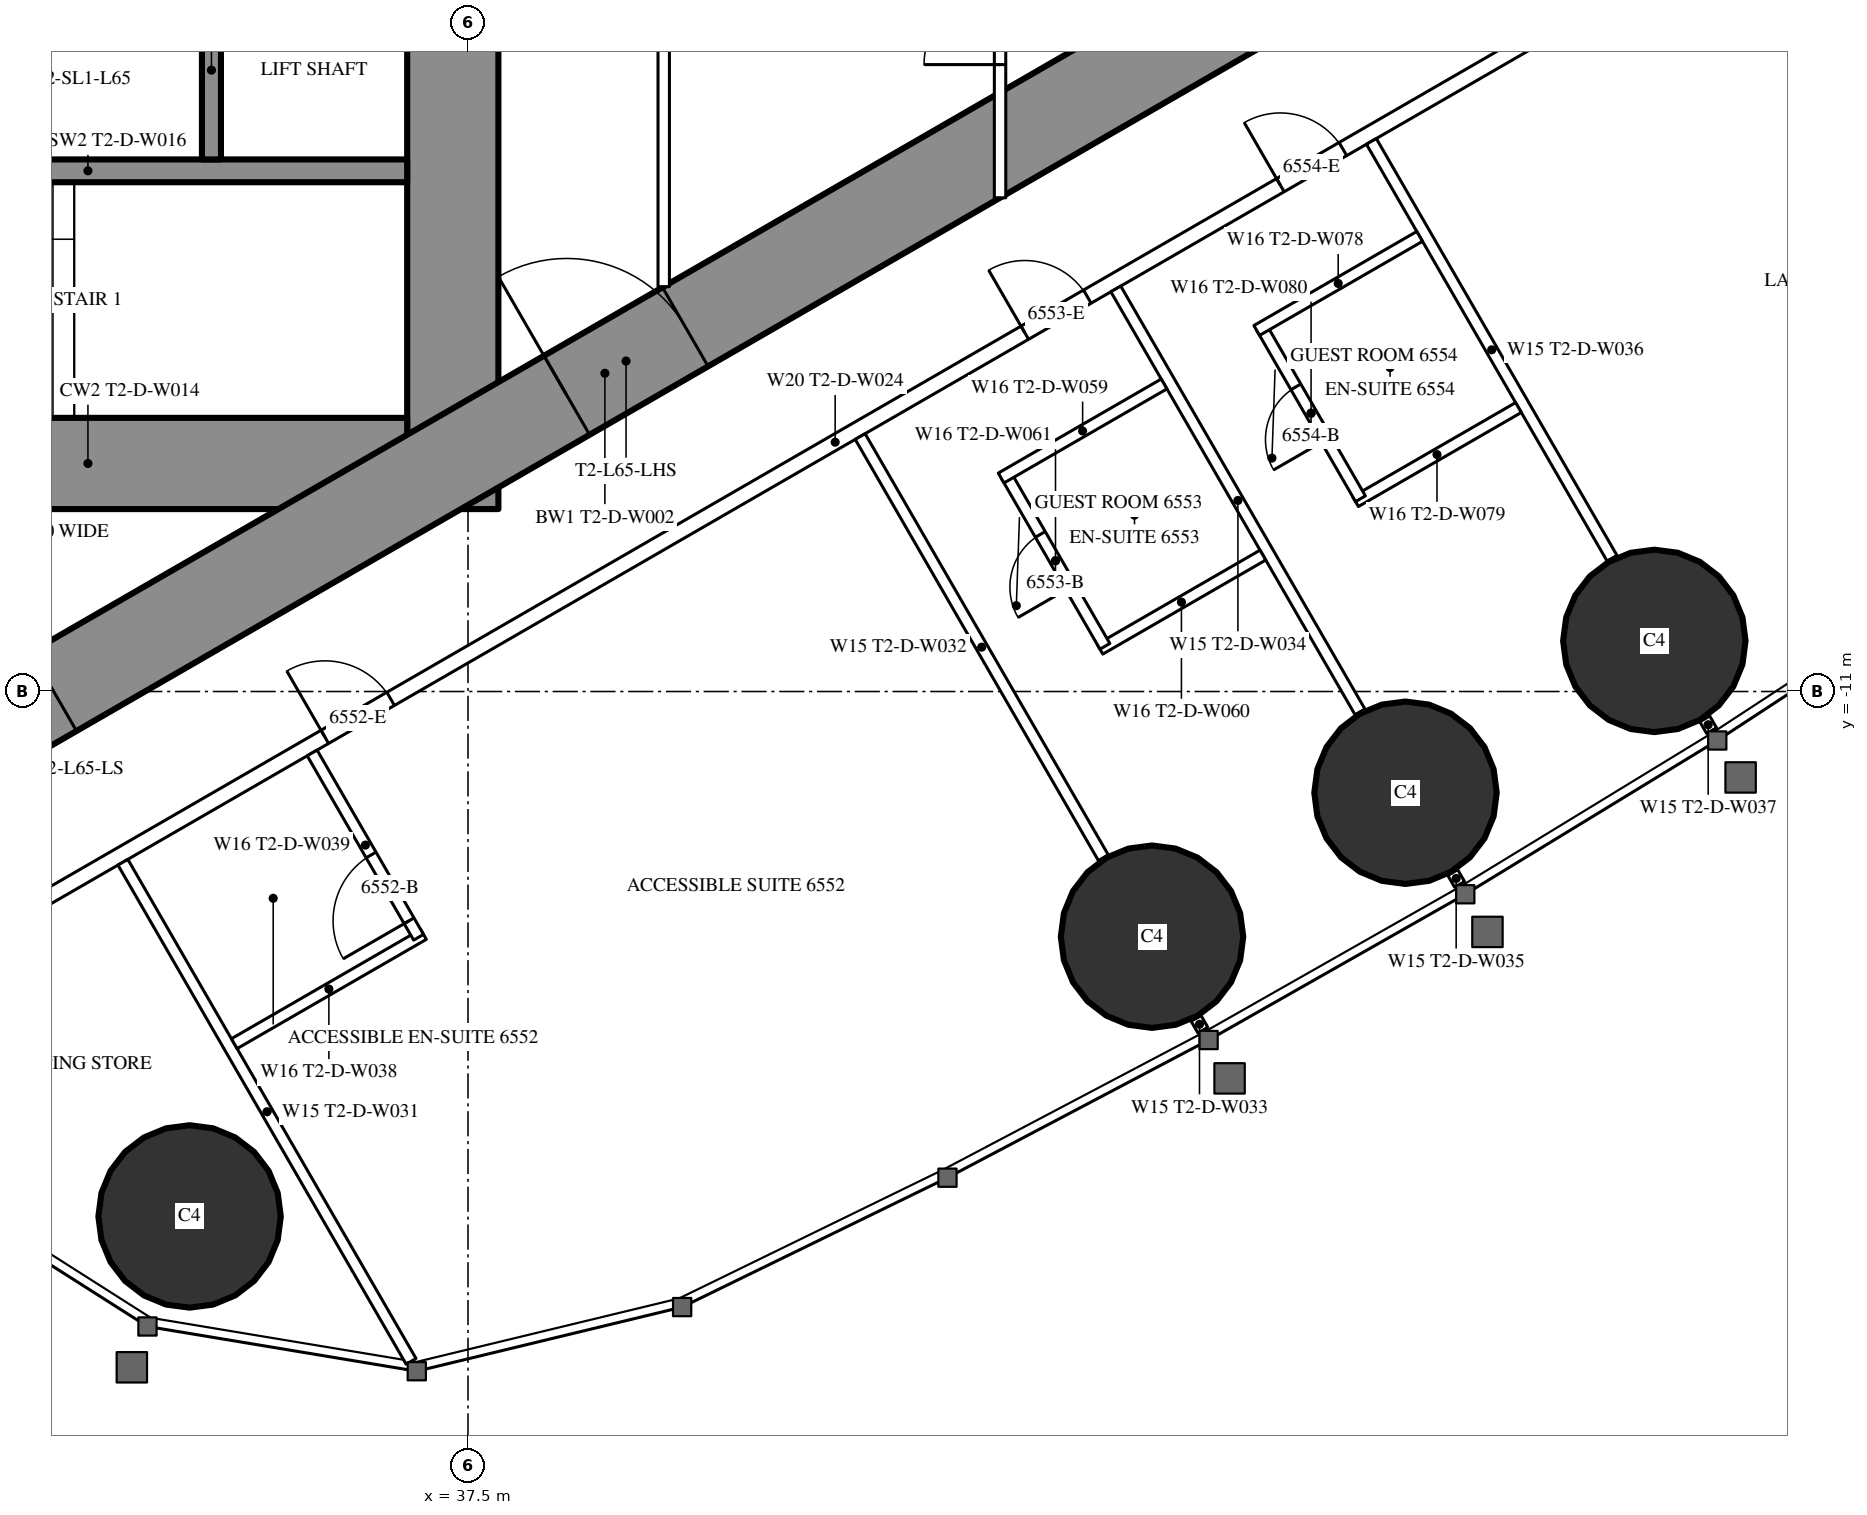
"""IFC4 building model, lengths in metres.
Left out: names, types, materials, properties, quantities, classifications, styles, units other than length and angle.
Written with IfcOpenShell. Run it as: python <this file> out.ifc"""

import sys

from ifc_helpers import new_model, si_unit, direction, frame, frame_2d, origin, origin_2d, place, context, subcontext, project, spatial, rectangle, circle, extrude, element, fill, save


model = new_model("IFC4")
c1 = context("Model", 3, precision=1e-05, world=origin(), true_north=direction((0.0, 1.0)))
c2 = subcontext(c1, "Body", "Model", "MODEL_VIEW")
j1 = project(units=[si_unit("LENGTHUNIT", "METRE"), si_unit("PLANEANGLEUNIT", "RADIAN")], contexts=[c1])
p1 = place(None, origin())
s1 = spatial("IfcSite", under=j1, at=p1, CompositionType="ELEMENT")
p2 = place(p1, origin())
s2 = spatial("IfcBuilding", under=s1, at=p2, CompositionType="ELEMENT")
p3 = place(p2, frame((0.0, 0.0, 244.1)))
s3 = spatial("IfcBuildingStorey", under=s2, at=p3, CompositionType="ELEMENT", Elevation=244.1)
for number, where, z_axis, x_axis in (
    (1, (33.837, -17.906, 0.0), (0.0, 0.0, 1.0), (1.0, 0.0, 0.0)),
    (2, (46.499, -14.226, 0.0), (0.0, 0.0, 1.0), (1.0, 0.0, 0.0)),
    (3, (49.834, -12.332, 0.0), (0.0, 0.0, 1.0), (1.0, 0.0, 0.0)),
    (4, (53.108, -10.334, 0.0), (0.0, 0.0, 1.0), (1.0, 0.0, 0.0)),
):
    element("IfcColumn", number, at=place(p3, frame(where, z_axis=z_axis, x_axis=x_axis)), inside=s3, PredefinedType="COLUMN", context=c2, shape_type="SweptSolid", body=[
        extrude(circle(Radius=1.2, at=origin_2d()), origin(), (0.0, 0.0, 1.0), 3.6),
    ])
p4 = place(p3, frame((37.3, -8.6, 0.0), z_axis=(0.0, 0.0, 1.0), x_axis=(0.0, 1.0, 0.0)))
e5 = element("IfcWall", 5, at=p4, inside=s3, PredefinedType="SHEAR", context=c2, shape_type="SweptSolid", body=[
    extrude(rectangle(XDim=17.2, YDim=1.2, at=frame_2d((8.6, 0.0))), origin(), (0.0, 0.0, 1.0), 3.6),
])
p5 = place(p4, frame((7.7, 0.0, 0.0)))
e6 = element("IfcOpeningElement", 6, at=p5, cuts=e5, PredefinedType="OPENING", context=c2, shape_type="SweptSolid", body=[
    extrude(rectangle(XDim=1.8, YDim=2.2, at=frame_2d((0.9, 1.1))), frame((0.0, 0.61, 0.0), z_axis=(0.0, -1.0, 0.0), x_axis=(1.0, 0.0, 0.0)), (0.0, 0.0, 1.0), 1.22),
])
p6 = place(p3, frame((28.3, -8.0, 0.0), z_axis=(0.0, 0.0, 1.0), x_axis=(1.0, 0.0, 0.0)))
e7 = element("IfcWall", 7, at=p6, inside=s3, PredefinedType="SHEAR", context=c2, shape_type="SweptSolid", body=[
    extrude(rectangle(XDim=8.4, YDim=1.2, at=frame_2d((4.2, 0.0))), origin(), (0.0, 0.0, 1.0), 3.6),
])
p7 = place(p6, frame((0.25, 0.0, 0.0)))
e8 = element("IfcOpeningElement", 8, at=p7, cuts=e7, PredefinedType="OPENING", context=c2, shape_type="SweptSolid", body=[
    extrude(rectangle(XDim=1.0, YDim=2.2, at=frame_2d((0.5, 1.1))), frame((0.0, 0.61, 0.0), z_axis=(0.0, -1.0, 0.0), x_axis=(1.0, 0.0, 0.0)), (0.0, 0.0, 1.0), 1.22),
])
p8 = place(p3, frame((28.3, -4.15, 0.0), z_axis=(0.0, 0.0, 1.0), x_axis=(1.0, 0.0, 0.0)))
e9 = element("IfcWall", 9, at=p8, inside=s3, PredefinedType="SHEAR", context=c2, shape_type="SweptSolid", body=[
    extrude(rectangle(XDim=8.4, YDim=0.3, at=frame_2d((4.2, 0.0))), origin(), (0.0, 0.0, 1.0), 3.6),
])
p9 = place(p3, frame((34.125, -4.0, 0.0), z_axis=(0.0, 0.0, 1.0), x_axis=(0.0, 1.0, 0.0)))
e10 = element("IfcWall", 10, at=p9, inside=s3, PredefinedType="SHEAR", context=c2, shape_type="SweptSolid", body=[
    extrude(rectangle(XDim=2.35, YDim=0.25, at=frame_2d((1.175, 0.0))), origin(), (0.0, 0.0, 1.0), 3.6),
])
p10 = place(p3, frame((27.2, -13.8, 0.0), z_axis=(0.0, 0.0, 1.0), x_axis=(0.866027159892, 0.499996958321, 0.0)))
e11 = element("IfcWall", 11, at=p10, inside=s3, PredefinedType="SHEAR", context=c2, shape_type="SweptSolid", body=[
    extrude(rectangle(XDim=27.947, YDim=1.2, at=frame_2d((13.973, 0.0))), origin(), (0.0, 0.0, 1.0), 3.6),
])
p11 = place(p10, frame((4.6, 0.0, 0.0)))
e12 = element("IfcOpeningElement", 12, at=p11, cuts=e11, PredefinedType="OPENING", context=c2, shape_type="SweptSolid", body=[
    extrude(rectangle(XDim=1.0, YDim=2.2, at=frame_2d((0.5, 1.1))), frame((0.0, 0.61, 0.0), z_axis=(0.0, -1.0, 0.0), x_axis=(1.0, 0.0, 0.0)), (0.0, 0.0, 1.0), 1.22),
])
p12 = place(p10, frame((13.395, 0.0, 0.0)))
e13 = element("IfcOpeningElement", 13, at=p12, cuts=e11, PredefinedType="OPENING", context=c2, shape_type="SweptSolid", body=[
    extrude(rectangle(XDim=1.8, YDim=2.2, at=frame_2d((0.9, 1.1))), frame((0.0, 0.61, 0.0), z_axis=(0.0, -1.0, 0.0), x_axis=(1.0, 0.0, 0.0)), (0.0, 0.0, 1.0), 1.22),
])
p13 = place(p3, frame((28.959, -15.44, 0.0), z_axis=(0.0, 0.0, 1.0), x_axis=(0.866025227435, 0.500000305447, 0.0)))
e14 = element("IfcWall", 14, at=p13, inside=s3, PredefinedType="PARTITIONING", context=c2, shape_type="SweptSolid", body=[
    extrude(rectangle(XDim=30.88, YDim=0.2, at=frame_2d((15.44, 0.0))), origin(), (0.0, 0.0, 1.0), 3.35),
])
p14 = place(p13, frame((1.494, 0.0, 0.0)))
e15 = element("IfcOpeningElement", 15, at=p14, cuts=e14, PredefinedType="OPENING", context=c2, shape_type="SweptSolid", body=[
    extrude(rectangle(XDim=1.8, YDim=2.04, at=frame_2d((0.9, 1.02))), frame((0.0, 0.11, 0.0), z_axis=(0.0, -1.0, 0.0), x_axis=(1.0, 0.0, 0.0)), (0.0, 0.0, 1.0), 0.22),
])
p15 = place(p13, frame((7.687, 0.0, 0.0)))
e16 = element("IfcOpeningElement", 16, at=p15, cuts=e14, PredefinedType="OPENING", context=c2, shape_type="SweptSolid", body=[
    extrude(rectangle(XDim=1.0, YDim=2.2, at=frame_2d((0.5, 1.1))), frame((0.0, 0.11, 0.0), z_axis=(0.0, -1.0, 0.0), x_axis=(1.0, 0.0, 0.0)), (0.0, 0.0, 1.0), 0.22),
])
p16 = place(p13, frame((18.321, 0.0, 0.0)))
e17 = element("IfcOpeningElement", 17, at=p16, cuts=e14, PredefinedType="OPENING", context=c2, shape_type="SweptSolid", body=[
    extrude(rectangle(XDim=0.95, YDim=2.2, at=frame_2d((0.475, 1.1))), frame((0.0, 0.11, 0.0), z_axis=(0.0, -1.0, 0.0), x_axis=(1.0, 0.0, 0.0)), (0.0, 0.0, 1.0), 0.22),
])
p17 = place(p13, frame((22.203, 0.0, 0.0)))
e18 = element("IfcOpeningElement", 18, at=p17, cuts=e14, PredefinedType="OPENING", context=c2, shape_type="SweptSolid", body=[
    extrude(rectangle(XDim=0.95, YDim=2.2, at=frame_2d((0.475, 1.1))), frame((0.0, 0.11, 0.0), z_axis=(0.0, -1.0, 0.0), x_axis=(1.0, 0.0, 0.0)), (0.0, 0.0, 1.0), 0.22),
])
p18 = place(p13, frame((26.192, 0.0, 0.0)))
e19 = element("IfcOpeningElement", 19, at=p18, cuts=e14, PredefinedType="OPENING", context=c2, shape_type="SweptSolid", body=[
    extrude(rectangle(XDim=1.8, YDim=2.2, at=frame_2d((0.9, 1.1))), frame((0.0, 0.11, 0.0), z_axis=(0.0, -1.0, 0.0), x_axis=(1.0, 0.0, 0.0)), (0.0, 0.0, 1.0), 0.22),
])
p19 = place(p3, frame((32.96, -13.246, 0.0), z_axis=(0.0, 0.0, 1.0), x_axis=(0.500000236886, -0.866025267018, 0.0)))
e20 = element("IfcWall", 20, at=p19, inside=s3, PredefinedType="PARTITIONING", context=c2, shape_type="SweptSolid", body=[
    extrude(rectangle(XDim=7.583, YDim=0.15, at=frame_2d((3.791, 0.0))), origin(), (0.0, 0.0, 1.0), 3.35),
])
p20 = place(p3, frame((42.66, -7.646, 0.0), z_axis=(0.0, 0.0, 1.0), x_axis=(0.499996592859, -0.866027370889, 0.0)))
e21 = element("IfcWall", 21, at=p20, inside=s3, PredefinedType="PARTITIONING", context=c2, shape_type="SweptSolid", body=[
    extrude(rectangle(XDim=6.398, YDim=0.15, at=frame_2d((3.199, 0.0))), origin(), (0.0, 0.0, 1.0), 2.45),
])
p21 = place(p3, frame((47.079, -15.3, 0.0), z_axis=(0.0, 0.0, 1.0), x_axis=(0.499212083968, -0.866479829667, 0.0)))
e22 = element("IfcWall", 22, at=p21, inside=s3, PredefinedType="PARTITIONING", context=c2, shape_type="SweptSolid", body=[
    extrude(rectangle(XDim=0.179, YDim=0.15, at=frame_2d((0.09, 0.0))), origin(), (0.0, 0.0, 1.0), 2.45),
])
p22 = place(p3, frame((46.023, -5.704, 0.0), z_axis=(0.0, 0.0, 1.0), x_axis=(0.499984478165, -0.866034365135, 0.0)))
e23 = element("IfcWall", 23, at=p22, inside=s3, PredefinedType="PARTITIONING", context=c2, shape_type="SweptSolid", body=[
    extrude(rectangle(XDim=6.426, YDim=0.15, at=frame_2d((3.213, 0.0))), origin(), (0.0, 0.0, 1.0), 2.45),
])
p23 = place(p3, frame((50.456, -13.382, 0.0), z_axis=(0.0, 0.0, 1.0), x_axis=(0.500661834965, -0.865642955848, 0.0)))
e24 = element("IfcWall", 24, at=p23, inside=s3, PredefinedType="PARTITIONING", context=c2, shape_type="SweptSolid", body=[
    extrude(rectangle(XDim=0.18, YDim=0.15, at=frame_2d((0.09, 0.0))), origin(), (0.0, 0.0, 1.0), 2.45),
])
p24 = place(p3, frame((49.385, -3.763, 0.0), z_axis=(0.0, 0.0, 1.0), x_axis=(0.499999447814, -0.866025722589, 0.0)))
e25 = element("IfcWall", 25, at=p24, inside=s3, PredefinedType="PARTITIONING", context=c2, shape_type="SweptSolid", body=[
    extrude(rectangle(XDim=6.333, YDim=0.15, at=frame_2d((3.166, 0.0))), origin(), (0.0, 0.0, 1.0), 2.45),
])
p25 = place(p3, frame((53.771, -11.36, 0.0), z_axis=(0.0, 0.0, 1.0), x_axis=(0.499524978789, -0.866299483762, 0.0)))
e26 = element("IfcWall", 26, at=p25, inside=s3, PredefinedType="PARTITIONING", context=c2, shape_type="SweptSolid", body=[
    extrude(rectangle(XDim=0.178, YDim=0.15, at=frame_2d((0.089, 0.0))), origin(), (0.0, 0.0, 1.0), 2.45),
])
p26 = place(p3, frame((34.425, -15.633, 0.0), z_axis=(0.0, 0.0, 1.0), x_axis=(0.866018712932, 0.500011588718, 0.0)))
e27 = element("IfcWall", 27, at=p26, inside=s3, PredefinedType="PARTITIONING", context=c2, shape_type="SweptSolid", body=[
    extrude(rectangle(XDim=2.875, YDim=0.15, at=frame_2d((1.438, 0.0))), origin(), (0.0, 0.0, 1.0), 3.35),
])
p27 = place(p3, frame((35.45, -11.808, 0.0), z_axis=(0.0, 0.0, 1.0), x_axis=(0.49994636267, -0.866056369097, 0.0)))
e28 = element("IfcWall", 28, at=p27, inside=s3, PredefinedType="PARTITIONING", context=c2, shape_type="SweptSolid", body=[
    extrude(rectangle(XDim=2.8, YDim=0.15, at=frame_2d((1.4, 0.0))), origin(), (0.0, 0.0, 1.0), 3.35),
])
p28 = place(p27, frame((1.55, 0.0, 0.0)))
e29 = element("IfcOpeningElement", 29, at=p28, cuts=e28, PredefinedType="OPENING", context=c2, shape_type="SweptSolid", body=[
    extrude(rectangle(XDim=1.0, YDim=2.2, at=frame_2d((0.5, 1.1))), frame((0.0, 0.085, 0.0), z_axis=(0.0, -1.0, 0.0), x_axis=(1.0, 0.0, 0.0)), (0.0, 0.0, 1.0), 0.17),
])
p29 = place(p3, frame((45.814, -10.443, 0.0), z_axis=(0.0, 0.0, 1.0), x_axis=(0.866073894602, 0.499916002032, 0.0)))
e30 = element("IfcWall", 30, at=p29, inside=s3, PredefinedType="PARTITIONING", context=c2, shape_type="SweptSolid", body=[
    extrude(rectangle(XDim=2.475, YDim=0.15, at=frame_2d((1.238, 0.0))), origin(), (0.0, 0.0, 1.0), 3.35),
])
p30 = place(p3, frame((44.579, -8.154, 0.0), z_axis=(0.0, 0.0, 1.0), x_axis=(0.500006934395, -0.866021400173, 0.0)))
e31 = element("IfcWall", 31, at=p30, inside=s3, PredefinedType="PARTITIONING", context=c2, shape_type="SweptSolid", body=[
    extrude(rectangle(XDim=2.6, YDim=0.15, at=frame_2d((1.3, 0.0))), origin(), (0.0, 0.0, 1.0), 3.35),
])
p31 = place(p30, frame((0.9, 0.0, 0.0)))
e32 = element("IfcOpeningElement", 32, at=p31, cuts=e31, PredefinedType="OPENING", context=c2, shape_type="SweptSolid", body=[
    extrude(rectangle(XDim=0.8, YDim=2.2, at=frame_2d((0.4, 1.1))), frame((0.0, 0.085, 0.0), z_axis=(0.0, -1.0, 0.0), x_axis=(1.0, 0.0, 0.0)), (0.0, 0.0, 1.0), 0.17),
])
for number, where, z_axis, x_axis in (
    (33, (44.514, -8.191, 0.0), (0.0, 0.0, 1.0), (0.866, 0.5, 0.0)),
    (34, (49.177, -8.502, 0.0), (0.0, 0.0, 1.0), (0.866, 0.5, 0.0)),
):
    element("IfcWall", number, at=place(p3, frame(where, z_axis=z_axis, x_axis=x_axis)), inside=s3, PredefinedType="PARTITIONING", context=c2, shape_type="SweptSolid", body=[
        extrude(rectangle(XDim=2.475, YDim=0.15, at=frame_2d((1.238, 0.0))), origin(), (0.0, 0.0, 1.0), 3.35),
    ])
p32 = place(p3, frame((47.942, -6.213, 0.0), z_axis=(0.0, 0.0, 1.0), x_axis=(0.500047596559, -0.865997922154, 0.0)))
e35 = element("IfcWall", 35, at=p32, inside=s3, PredefinedType="PARTITIONING", context=c2, shape_type="SweptSolid", body=[
    extrude(rectangle(XDim=2.6, YDim=0.15, at=frame_2d((1.3, 0.0))), origin(), (0.0, 0.0, 1.0), 3.35),
])
p33 = place(p32, frame((0.9, 0.0, 0.0)))
e36 = element("IfcOpeningElement", 36, at=p33, cuts=e35, PredefinedType="OPENING", context=c2, shape_type="SweptSolid", body=[
    extrude(rectangle(XDim=0.8, YDim=2.2, at=frame_2d((0.4, 1.1))), frame((0.0, 0.085, 0.0), z_axis=(0.0, -1.0, 0.0), x_axis=(1.0, 0.0, 0.0)), (0.0, 0.0, 1.0), 0.17),
])
p34 = place(p3, frame((47.877, -6.25, 0.0), z_axis=(0.0, 0.0, 1.0), x_axis=(0.866031185235, 0.4999899861, 0.0)))
e37 = element("IfcWall", 37, at=p34, inside=s3, PredefinedType="PARTITIONING", context=c2, shape_type="SweptSolid", body=[
    extrude(rectangle(XDim=2.475, YDim=0.15, at=frame_2d((1.238, 0.0))), origin(), (0.0, 0.0, 1.0), 3.35),
])
p35 = place(p3, frame((40.075, -5.674, 0.0), z_axis=(0.0, 0.0, 1.0), x_axis=(0.0, 1.0, 0.0)))
e38 = element("IfcWall", 38, at=p35, inside=s3, PredefinedType="PARTITIONING", context=c2, shape_type="SweptSolid", body=[
    extrude(rectangle(XDim=11.348, YDim=0.15, at=frame_2d((5.674, 0.0))), origin(), (0.0, 0.0, 1.0), 3.35),
])
p36 = place(p35, frame((4.774, 0.0, 0.0)))
e39 = element("IfcOpeningElement", 39, at=p36, cuts=e38, PredefinedType="OPENING", context=c2, shape_type="SweptSolid", body=[
    extrude(rectangle(XDim=1.8, YDim=2.2, at=frame_2d((0.9, 1.1))), frame((0.0, 0.085, 0.0), z_axis=(0.0, -1.0, 0.0), x_axis=(1.0, 0.0, 0.0)), (0.0, 0.0, 1.0), 0.17),
])
p37 = place(p3, frame((44.5, -4.505, 0.0), z_axis=(0.0, 0.0, 1.0), x_axis=(0.0, 1.0, 0.0)))
e40 = element("IfcWall", 40, at=p37, inside=s3, PredefinedType="PARTITIONING", context=c2, shape_type="SweptSolid", body=[
    extrude(rectangle(XDim=9.009, YDim=0.15, at=frame_2d((4.505, 0.0))), origin(), (0.0, 0.0, 1.0), 3.35),
])
p38 = place(p37, frame((1.752, 0.0, 0.0)))
e41 = element("IfcOpeningElement", 41, at=p38, cuts=e40, PredefinedType="OPENING", context=c2, shape_type="SweptSolid", body=[
    extrude(rectangle(XDim=1.0, YDim=2.2, at=frame_2d((0.5, 1.1))), frame((0.0, 0.085, 0.0), z_axis=(0.0, -1.0, 0.0), x_axis=(1.0, 0.0, 0.0)), (0.0, 0.0, 1.0), 0.17),
])
p39 = place(p37, frame((6.257, 0.0, 0.0)))
e42 = element("IfcOpeningElement", 42, at=p39, cuts=e40, PredefinedType="OPENING", context=c2, shape_type="SweptSolid", body=[
    extrude(rectangle(XDim=1.0, YDim=2.2, at=frame_2d((0.5, 1.1))), frame((0.0, 0.085, 0.0), z_axis=(0.0, -1.0, 0.0), x_axis=(1.0, 0.0, 0.0)), (0.0, 0.0, 1.0), 0.17),
])
p40 = place(p28, origin())
e43 = element("IfcDoor", 43, at=p40, inside=s3, OperationType="SINGLE_SWING_RIGHT", PredefinedType="DOOR", context=c2, shape_type="SweptSolid", body=[
    extrude(rectangle(XDim=1.0, YDim=2.2, at=frame_2d((0.5, 1.1))), frame((0.0, 0.025, 0.0), z_axis=(0.0, -1.0, 0.0), x_axis=(1.0, 0.0, 0.0)), (0.0, 0.0, 1.0), 0.05),
])
fill(e29, e43)
p41 = place(p15, origin())
e44 = element("IfcDoor", 44, at=p41, inside=s3, OperationType="SINGLE_SWING_LEFT", PredefinedType="DOOR", context=c2, shape_type="SweptSolid", body=[
    extrude(rectangle(XDim=1.0, YDim=2.2, at=frame_2d((0.5, 1.1))), frame((0.0, 0.025, 0.0), z_axis=(0.0, -1.0, 0.0), x_axis=(1.0, 0.0, 0.0)), (0.0, 0.0, 1.0), 0.05),
])
fill(e16, e44)
p42 = place(p31, origin())
e45 = element("IfcDoor", 45, at=p42, inside=s3, OperationType="SINGLE_SWING_RIGHT", PredefinedType="DOOR", context=c2, shape_type="SweptSolid", body=[
    extrude(rectangle(XDim=0.8, YDim=2.2, at=frame_2d((0.4, 1.1))), frame((0.0, 0.025, 0.0), z_axis=(0.0, -1.0, 0.0), x_axis=(1.0, 0.0, 0.0)), (0.0, 0.0, 1.0), 0.05),
])
fill(e32, e45)
p43 = place(p16, origin())
e46 = element("IfcDoor", 46, at=p43, inside=s3, OperationType="SINGLE_SWING_LEFT", PredefinedType="DOOR", context=c2, shape_type="SweptSolid", body=[
    extrude(rectangle(XDim=0.95, YDim=2.2, at=frame_2d((0.475, 1.1))), frame((0.0, 0.025, 0.0), z_axis=(0.0, -1.0, 0.0), x_axis=(1.0, 0.0, 0.0)), (0.0, 0.0, 1.0), 0.05),
])
fill(e17, e46)
p44 = place(p33, origin())
e47 = element("IfcDoor", 47, at=p44, inside=s3, OperationType="SINGLE_SWING_RIGHT", PredefinedType="DOOR", context=c2, shape_type="SweptSolid", body=[
    extrude(rectangle(XDim=0.8, YDim=2.2, at=frame_2d((0.4, 1.1))), frame((0.0, 0.025, 0.0), z_axis=(0.0, -1.0, 0.0), x_axis=(1.0, 0.0, 0.0)), (0.0, 0.0, 1.0), 0.05),
])
fill(e36, e47)
p45 = place(p17, origin())
e48 = element("IfcDoor", 48, at=p45, inside=s3, OperationType="SINGLE_SWING_LEFT", PredefinedType="DOOR", context=c2, shape_type="SweptSolid", body=[
    extrude(rectangle(XDim=0.95, YDim=2.2, at=frame_2d((0.475, 1.1))), frame((0.0, 0.025, 0.0), z_axis=(0.0, -1.0, 0.0), x_axis=(1.0, 0.0, 0.0)), (0.0, 0.0, 1.0), 0.05),
])
fill(e18, e48)
p46 = place(p38, origin())
e49 = element("IfcDoor", 49, at=p46, inside=s3, OperationType="SINGLE_SWING_LEFT", PredefinedType="DOOR", context=c2, shape_type="SweptSolid", body=[
    extrude(rectangle(XDim=1.0, YDim=2.2, at=frame_2d((0.5, 1.1))), frame((0.0, 0.025, 0.0), z_axis=(0.0, -1.0, 0.0), x_axis=(1.0, 0.0, 0.0)), (0.0, 0.0, 1.0), 0.05),
])
fill(e41, e49)
p47 = place(p11, origin())
e50 = element("IfcDoor", 50, at=p47, inside=s3, OperationType="SINGLE_SWING_LEFT", PredefinedType="DOOR", context=c2, shape_type="SweptSolid", body=[
    extrude(rectangle(XDim=1.0, YDim=2.2, at=frame_2d((0.5, 1.1))), frame((0.0, 0.025, 0.0), z_axis=(0.0, -1.0, 0.0), x_axis=(1.0, 0.0, 0.0)), (0.0, 0.0, 1.0), 0.05),
])
fill(e12, e50)
p48 = place(p12, origin())
e51 = element("IfcDoor", 51, at=p48, inside=s3, OperationType="DOUBLE_DOOR_SINGLE_SWING", PredefinedType="DOOR", context=c2, shape_type="SweptSolid", body=[
    extrude(rectangle(XDim=1.8, YDim=2.2, at=frame_2d((0.9, 1.1))), frame((0.0, 0.025, 0.0), z_axis=(0.0, -1.0, 0.0), x_axis=(1.0, 0.0, 0.0)), (0.0, 0.0, 1.0), 0.05),
])
fill(e13, e51)
save(model, sys.argv[1])
